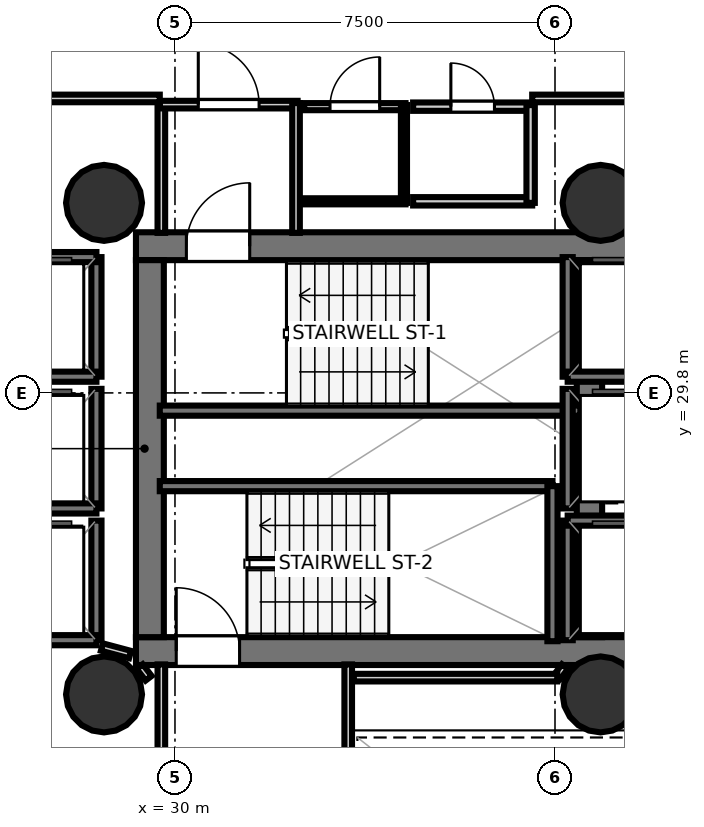
"""IFC4 building model, lengths in metres.
Left out: names, types, materials, properties, quantities, classifications, styles, units other than length and angle.
Written with IfcOpenShell. Run it as: python <this file> out.ifc"""

import sys

from ifc_helpers import new_model, si_unit, direction, frame, frame_2d, origin, origin_2d, place, context, subcontext, project, spatial, rectangle, hollow_circle, extrude, element, fill, save


model = new_model("IFC4")
c1 = context("Model", 3, precision=1e-05, world=origin(), true_north=direction((0.0, 1.0)))
c2 = subcontext(c1, "Body", "Model", "MODEL_VIEW")
j1 = project(units=[si_unit("LENGTHUNIT", "METRE"), si_unit("PLANEANGLEUNIT", "RADIAN")], contexts=[c1])
p1 = place(None, origin())
s1 = spatial("IfcSite", under=j1, at=p1, CompositionType="ELEMENT")
p2 = place(p1, origin())
s2 = spatial("IfcBuilding", under=s1, at=p2, CompositionType="ELEMENT")
p3 = place(p2, frame((0.0, 0.0, 131.1)))
s3 = spatial("IfcBuildingStorey", under=s2, at=p3, CompositionType="ELEMENT", Elevation=131.1)
p4 = place(p3, frame((29.23, 32.695, 0.0), z_axis=(0.0, 0.0, 1.0), x_axis=(1.0, 0.0, 0.0)))
e1 = element("IfcWall", 1, at=p4, inside=s3, PredefinedType="SHEAR", context=c2, shape_type="SweptSolid", body=[
    extrude(rectangle(XDim=10.62, YDim=0.55, at=frame_2d((5.31, 0.0))), origin(), (0.0, 0.0, 1.0), 3.52),
])
p5 = place(p4, frame((0.995, 0.0, 0.0)))
e2 = element("IfcOpeningElement", 2, at=p5, cuts=e1, PredefinedType="OPENING", context=c2, shape_type="SweptSolid", body=[
    extrude(rectangle(XDim=1.25, YDim=2.15, at=frame_2d((0.625, 1.075))), frame((0.0, 0.285, 0.0), z_axis=(0.0, -1.0, 0.0), x_axis=(1.0, 0.0, 0.0)), (0.0, 0.0, 1.0), 0.57),
])
p6 = place(p3, frame((29.23, 24.705, 0.0), z_axis=(0.0, 0.0, 1.0), x_axis=(1.0, 0.0, 0.0)))
e3 = element("IfcWall", 3, at=p6, inside=s3, PredefinedType="SHEAR", context=c2, shape_type="SweptSolid", body=[
    extrude(rectangle(XDim=10.62, YDim=0.55, at=frame_2d((5.31, 0.0))), origin(), (0.0, 0.0, 1.0), 3.52),
])
p7 = place(p6, frame((0.795, 0.0, 0.0)))
e4 = element("IfcOpeningElement", 4, at=p7, cuts=e3, PredefinedType="OPENING", context=c2, shape_type="SweptSolid", body=[
    extrude(rectangle(XDim=1.25, YDim=2.15, at=frame_2d((0.625, 1.075))), frame((0.0, 0.285, 0.0), z_axis=(0.0, -1.0, 0.0), x_axis=(1.0, 0.0, 0.0)), (0.0, 0.0, 1.0), 0.57),
])
p8 = place(p3, frame((29.505, 24.98, 0.0), z_axis=(0.0, 0.0, 1.0), x_axis=(0.0, 1.0, 0.0)))
e5 = element("IfcWall", 5, at=p8, inside=s3, PredefinedType="SHEAR", context=c2, shape_type="SweptSolid", body=[
    extrude(rectangle(XDim=7.44, YDim=0.55, at=frame_2d((3.72, 0.0))), origin(), (0.0, 0.0, 1.0), 3.52),
])
p9 = place(p3, frame((38.18, 24.98, 0.0), z_axis=(0.0, 0.0, 1.0), x_axis=(0.0, 1.0, 0.0)))
e6 = element("IfcWall", 6, at=p9, inside=s3, PredefinedType="SHEAR", context=c2, shape_type="SweptSolid", body=[
    extrude(rectangle(XDim=7.44, YDim=0.5, at=frame_2d((3.72, 0.0))), origin(), (0.0, 0.0, 1.0), 3.52),
])
for number, where, z_axis, x_axis in (
    (7, (28.6, 33.55, 0.0), (0.0, 0.0, 1.0), (1.0, 0.0, 0.0)),
    (8, (28.6, 23.85, 0.0), (0.0, 0.0, 1.0), (1.0, 0.0, 0.0)),
    (9, (38.4, 33.55, 0.0), (0.0, 0.0, 1.0), (1.0, 0.0, 0.0)),
    (10, (38.4, 23.85, 0.0), (0.0, 0.0, 1.0), (1.0, 0.0, 0.0)),
):
    element("IfcColumn", number, at=place(p3, frame(where, z_axis=z_axis, x_axis=x_axis)), inside=s3, PredefinedType="COLUMN", context=c2, shape_type="SweptSolid", body=[
        extrude(hollow_circle(Radius=0.75, WallThickness=0.036, at=origin_2d()), origin(), (0.0, 0.0, 1.0), 3.7),
    ])
p10 = place(p3, frame((29.7, 29.45, 0.0), z_axis=(0.0, 0.0, 1.0), x_axis=(1.0, 0.0, 0.0)))
e11 = element("IfcWall", 11, at=p10, inside=s3, PredefinedType="SOLIDWALL", context=c2, shape_type="SweptSolid", body=[
    extrude(rectangle(XDim=8.3, YDim=0.2, at=frame_2d((4.15, 0.0))), origin(), (0.0, 0.0, 1.0), 3.52),
])
p11 = place(p3, frame((29.7, 27.96, 0.0), z_axis=(0.0, 0.0, 1.0), x_axis=(1.0, 0.0, 0.0)))
e12 = element("IfcWall", 12, at=p11, inside=s3, PredefinedType="SOLIDWALL", context=c2, shape_type="SweptSolid", body=[
    extrude(rectangle(XDim=7.75, YDim=0.2, at=frame_2d((3.875, 0.0))), origin(), (0.0, 0.0, 1.0), 3.52),
])
p12 = place(p3, frame((37.45, 24.9, 0.0), z_axis=(0.0, 0.0, 1.0), x_axis=(0.0, 1.0, 0.0)))
e13 = element("IfcWall", 13, at=p12, inside=s3, PredefinedType="SOLIDWALL", context=c2, shape_type="SweptSolid", body=[
    extrude(rectangle(XDim=3.06, YDim=0.2, at=frame_2d((1.53, 0.0))), origin(), (0.0, 0.0, 1.0), 3.52),
])
p13 = place(p3, frame((37.75, 30.12, 0.0), z_axis=(0.0, 0.0, 1.0), x_axis=(0.0, 1.0, 0.0)))
e14 = element("IfcWall", 14, at=p13, inside=s3, PredefinedType="SOLIDWALL", context=c2, shape_type="SweptSolid", body=[
    extrude(rectangle(XDim=2.36, YDim=0.2, at=frame_2d((1.18, 0.0))), origin(), (0.0, 0.0, 1.0), 3.52),
])
p14 = place(p3, frame((37.75, 30.12, 0.0), z_axis=(0.0, 0.0, 1.0), x_axis=(1.0, 0.0, 0.0)))
e15 = element("IfcWall", 15, at=p14, inside=s3, PredefinedType="SOLIDWALL", context=c2, shape_type="SweptSolid", body=[
    extrude(rectangle(XDim=2.1, YDim=0.2, at=frame_2d((1.05, 0.0))), origin(), (0.0, 0.0, 1.0), 3.52),
])
p15 = place(p3, frame((37.75, 24.92, 0.0), z_axis=(0.0, 0.0, 1.0), x_axis=(0.0, 1.0, 0.0)))
e16 = element("IfcWall", 16, at=p15, inside=s3, PredefinedType="SOLIDWALL", context=c2, shape_type="SweptSolid", body=[
    extrude(rectangle(XDim=2.36, YDim=0.2, at=frame_2d((1.18, 0.0))), origin(), (0.0, 0.0, 1.0), 3.52),
])
p16 = place(p3, frame((37.75, 27.28, 0.0), z_axis=(0.0, 0.0, 1.0), x_axis=(1.0, 0.0, 0.0)))
e17 = element("IfcWall", 17, at=p16, inside=s3, PredefinedType="SOLIDWALL", context=c2, shape_type="SweptSolid", body=[
    extrude(rectangle(XDim=2.1, YDim=0.2, at=frame_2d((1.05, 0.0))), origin(), (0.0, 0.0, 1.0), 3.52),
])
p17 = place(p3, frame((28.45, 30.12, 0.0), z_axis=(0.0, 0.0, 1.0), x_axis=(0.0, 1.0, 0.0)))
e18 = element("IfcWall", 18, at=p17, inside=s3, PredefinedType="SOLIDWALL", context=c2, shape_type="SweptSolid", body=[
    extrude(rectangle(XDim=2.36, YDim=0.2, at=frame_2d((1.18, 0.0))), origin(), (0.0, 0.0, 1.0), 3.52),
])
for number, where, z_axis, x_axis in (
    (19, (26.35, 32.48, 0.0), (0.0, 0.0, 1.0), (1.0, 0.0, 0.0)),
    (20, (26.35, 30.12, 0.0), (0.0, 0.0, 1.0), (1.0, 0.0, 0.0)),
):
    element("IfcWall", number, at=place(p3, frame(where, z_axis=z_axis, x_axis=x_axis)), inside=s3, PredefinedType="SOLIDWALL", context=c2, shape_type="SweptSolid", body=[
        extrude(rectangle(XDim=2.1, YDim=0.2, at=frame_2d((1.05, 0.0))), origin(), (0.0, 0.0, 1.0), 3.52),
    ])
p18 = place(p3, frame((28.45, 27.52, 0.0), z_axis=(0.0, 0.0, 1.0), x_axis=(0.0, 1.0, 0.0)))
e21 = element("IfcWall", 21, at=p18, inside=s3, PredefinedType="SOLIDWALL", context=c2, shape_type="SweptSolid", body=[
    extrude(rectangle(XDim=2.36, YDim=0.2, at=frame_2d((1.18, 0.0))), origin(), (0.0, 0.0, 1.0), 3.52),
])
p19 = place(p3, frame((26.35, 27.52, 0.0), z_axis=(0.0, 0.0, 1.0), x_axis=(1.0, 0.0, 0.0)))
e22 = element("IfcWall", 22, at=p19, inside=s3, PredefinedType="SOLIDWALL", context=c2, shape_type="SweptSolid", body=[
    extrude(rectangle(XDim=2.1, YDim=0.2, at=frame_2d((1.05, 0.0))), origin(), (0.0, 0.0, 1.0), 3.52),
])
p20 = place(p3, frame((28.45, 24.92, 0.0), z_axis=(0.0, 0.0, 1.0), x_axis=(0.0, 1.0, 0.0)))
e23 = element("IfcWall", 23, at=p20, inside=s3, PredefinedType="SOLIDWALL", context=c2, shape_type="SweptSolid", body=[
    extrude(rectangle(XDim=2.36, YDim=0.2, at=frame_2d((1.18, 0.0))), origin(), (0.0, 0.0, 1.0), 3.52),
])
p21 = place(p3, frame((26.35, 24.92, 0.0), z_axis=(0.0, 0.0, 1.0), x_axis=(1.0, 0.0, 0.0)))
e24 = element("IfcWall", 24, at=p21, inside=s3, PredefinedType="SOLIDWALL", context=c2, shape_type="SweptSolid", body=[
    extrude(rectangle(XDim=2.1, YDim=0.2, at=frame_2d((1.05, 0.0))), origin(), (0.0, 0.0, 1.0), 3.52),
])
p22 = place(p3, frame((37.75, 27.52, 0.0), z_axis=(0.0, 0.0, 1.0), x_axis=(0.0, 1.0, 0.0)))
e25 = element("IfcWall", 25, at=p22, inside=s3, PredefinedType="SOLIDWALL", context=c2, shape_type="SweptSolid", body=[
    extrude(rectangle(XDim=2.36, YDim=0.2, at=frame_2d((1.18, 0.0))), origin(), (0.0, 0.0, 1.0), 3.52),
])
p23 = place(p3, frame((29.731, 32.958, 0.0), z_axis=(0.0, 0.0, 1.0), x_axis=(0.0, 1.0, 0.0)))
e26 = element("IfcWall", 26, at=p23, inside=s3, PredefinedType="PARTITIONING", context=c2, shape_type="SweptSolid", body=[
    extrude(rectangle(XDim=2.562, YDim=0.15, at=frame_2d((1.281, 0.0))), origin(), (0.0, 0.0, 1.0), 2.84),
])
p24 = place(p3, frame((29.7, 35.489, 0.0), z_axis=(0.0, 0.0, 1.0), x_axis=(1.0, 0.0, 0.0)))
e27 = element("IfcWall", 27, at=p24, inside=s3, PredefinedType="PARTITIONING", context=c2, shape_type="SweptSolid", body=[
    extrude(rectangle(XDim=2.72, YDim=0.15, at=frame_2d((1.36, 0.0))), origin(), (0.0, 0.0, 1.0), 2.84),
])
p25 = place(p24, frame((0.76, 0.0, 0.0)))
e28 = element("IfcOpeningElement", 28, at=p25, cuts=e27, PredefinedType="OPENING", context=c2, shape_type="SweptSolid", body=[
    extrude(rectangle(XDim=1.2, YDim=2.15, at=frame_2d((0.6, 1.075))), frame((0.0, 0.085, 0.0), z_axis=(0.0, -1.0, 0.0), x_axis=(1.0, 0.0, 0.0)), (0.0, 0.0, 1.0), 0.17),
])
p26 = place(p3, frame((32.389, 35.52, 0.0), z_axis=(0.0, 0.0, 1.0), x_axis=(0.0, -1.0, 0.0)))
e29 = element("IfcWall", 29, at=p26, inside=s3, PredefinedType="PARTITIONING", context=c2, shape_type="SweptSolid", body=[
    extrude(rectangle(XDim=2.562, YDim=0.15, at=frame_2d((1.281, 0.0))), origin(), (0.0, 0.0, 1.0), 2.84),
])
for number, where, z_axis, x_axis in (
    (30, (29.731, 21.85, 0.0), (0.0, 0.0, 1.0), (0.0, 1.0, 0.0)),
    (31, (33.419, 24.442, 0.0), (0.0, 0.0, 1.0), (0.0, -1.0, 0.0)),
):
    element("IfcWall", number, at=place(p3, frame(where, z_axis=z_axis, x_axis=x_axis)), inside=s3, PredefinedType="PARTITIONING", context=c2, shape_type="SweptSolid", body=[
        extrude(rectangle(XDim=2.592, YDim=0.15, at=frame_2d((1.296, 0.0))), origin(), (0.0, 0.0, 1.0), 2.84),
    ])
p27 = place(p3, frame((34.55, 33.581, 0.0), z_axis=(0.0, 0.0, 1.0), x_axis=(-1.0, 0.0, 0.0)))
e32 = element("IfcWall", 32, at=p27, inside=s3, PredefinedType="PARTITIONING", context=c2, shape_type="SweptSolid", body=[
    extrude(rectangle(XDim=2.0, YDim=0.12, at=frame_2d((1.0, 0.0))), origin(), (0.0, 0.0, 1.0), 2.84),
])
p28 = place(p3, frame((32.55, 35.449, 0.0), z_axis=(0.0, 0.0, 1.0), x_axis=(1.0, 0.0, 0.0)))
e33 = element("IfcWall", 33, at=p28, inside=s3, PredefinedType="PARTITIONING", context=c2, shape_type="SweptSolid", body=[
    extrude(rectangle(XDim=2.0, YDim=0.14, at=frame_2d((1.0, 0.0))), origin(), (0.0, 0.0, 1.0), 2.84),
])
p29 = place(p28, frame((0.51, 0.0, 0.0)))
e34 = element("IfcOpeningElement", 34, at=p29, cuts=e33, PredefinedType="OPENING", context=c2, shape_type="SweptSolid", body=[
    extrude(rectangle(XDim=0.98, YDim=2.1, at=frame_2d((0.49, 1.05))), frame((0.0, 0.08, 0.0), z_axis=(0.0, -1.0, 0.0), x_axis=(1.0, 0.0, 0.0)), (0.0, 0.0, 1.0), 0.16),
])
p30 = place(p3, frame((34.519, 35.48, 0.0), z_axis=(0.0, 0.0, 1.0), x_axis=(0.0, -1.0, 0.0)))
e35 = element("IfcWall", 35, at=p30, inside=s3, PredefinedType="PARTITIONING", context=c2, shape_type="SweptSolid", body=[
    extrude(rectangle(XDim=1.93, YDim=0.12, at=frame_2d((0.965, 0.0))), origin(), (0.0, 0.0, 1.0), 2.84),
])
p31 = place(p3, frame((37.05, 33.581, 0.0), z_axis=(0.0, 0.0, 1.0), x_axis=(-1.0, 0.0, 0.0)))
e36 = element("IfcWall", 36, at=p31, inside=s3, PredefinedType="PLUMBINGWALL", context=c2, shape_type="SweptSolid", body=[
    extrude(rectangle(XDim=2.35, YDim=0.165, at=frame_2d((1.175, 0.0))), origin(), (0.0, 0.0, 1.0), 2.84),
])
p32 = place(p3, frame((34.7, 35.449, 0.0), z_axis=(0.0, 0.0, 1.0), x_axis=(1.0, 0.0, 0.0)))
e37 = element("IfcWall", 37, at=p32, inside=s3, PredefinedType="PLUMBINGWALL", context=c2, shape_type="SweptSolid", body=[
    extrude(rectangle(XDim=2.35, YDim=0.165, at=frame_2d((1.175, 0.0))), origin(), (0.0, 0.0, 1.0), 2.84),
])
p33 = place(p32, frame((0.745, 0.0, 0.0)))
e38 = element("IfcOpeningElement", 38, at=p33, cuts=e37, PredefinedType="OPENING", context=c2, shape_type="SweptSolid", body=[
    extrude(rectangle(XDim=0.86, YDim=2.05, at=frame_2d((0.43, 1.025))), frame((0.0, 0.093, 0.0), z_axis=(0.0, -1.0, 0.0), x_axis=(1.0, 0.0, 0.0)), (0.0, 0.0, 1.0), 0.185),
])
p34 = place(p3, frame((37.019, 35.48, 0.0), z_axis=(0.0, 0.0, 1.0), x_axis=(0.0, -1.0, 0.0)))
e39 = element("IfcWall", 39, at=p34, inside=s3, PredefinedType="PLUMBINGWALL", context=c2, shape_type="SweptSolid", body=[
    extrude(rectangle(XDim=1.93, YDim=0.165, at=frame_2d((0.965, 0.0))), origin(), (0.0, 0.0, 1.0), 2.84),
])
p35 = place(p3, frame((29.48, 24.169, 0.0), z_axis=(0.0, 0.0, 1.0), x_axis=(-0.608043045279, 0.79390405912, 0.0)))
e40 = element("IfcWall", 40, at=p35, inside=s3, PredefinedType="PARTITIONING", context=c2, shape_type="SweptSolid", body=[
    extrude(rectangle(XDim=0.29, YDim=0.15, at=frame_2d((0.145, 0.0))), origin(), (0.0, 0.0, 1.0), 2.84),
])
p36 = place(p3, frame((29.114, 24.637, 0.0), z_axis=(0.0, 0.0, 1.0), x_axis=(-0.966199685486, 0.257794817183, 0.0)))
e41 = element("IfcWall", 41, at=p36, inside=s3, PredefinedType="PARTITIONING", context=c2, shape_type="SweptSolid", body=[
    extrude(rectangle(XDim=0.575, YDim=0.15, at=frame_2d((0.288, 0.0))), origin(), (0.0, 0.0, 1.0), 2.84),
])
p37 = place(p3, frame((37.697, 24.399, 0.0), z_axis=(0.0, 0.0, 1.0), x_axis=(-0.60763139403, -0.794219169367, 0.0)))
e42 = element("IfcWall", 42, at=p37, inside=s3, PredefinedType="PARTITIONING", context=c2, shape_type="SweptSolid", body=[
    extrude(rectangle(XDim=0.25, YDim=0.15, at=frame_2d((0.125, 0.0))), origin(), (0.0, 0.0, 1.0), 2.84),
])
p38 = place(p3, frame((37.545, 24.181, 0.0), z_axis=(0.0, 0.0, 1.0), x_axis=(-1.0, 0.0, 0.0)))
e43 = element("IfcWall", 43, at=p38, inside=s3, PredefinedType="PARTITIONING", context=c2, shape_type="SweptSolid", body=[
    extrude(rectangle(XDim=4.015, YDim=0.15, at=frame_2d((2.007, 0.0))), origin(), (0.0, 0.0, 1.0), 2.84),
])
p39 = place(p3, frame((39.818, 35.611, 0.0), z_axis=(0.0, 0.0, 1.0), x_axis=(-1.0, 0.0, 0.0)))
e44 = element("IfcWall", 44, at=p39, inside=s3, PredefinedType="PARTITIONING", context=c2, shape_type="SweptSolid", body=[
    extrude(rectangle(XDim=2.768, YDim=0.15, at=frame_2d((1.384, 0.0))), origin(), (0.0, 0.0, 1.0), 2.84),
])
p40 = place(p3, frame((29.7, 35.611, 0.0), z_axis=(0.0, 0.0, 1.0), x_axis=(-1.0, 0.0, 0.0)))
e45 = element("IfcWall", 45, at=p40, inside=s3, PredefinedType="PARTITIONING", context=c2, shape_type="SweptSolid", body=[
    extrude(rectangle(XDim=3.28, YDim=0.15, at=frame_2d((1.64, 0.0))), origin(), (0.0, 0.0, 1.0), 2.84),
])
p41 = place(p5, origin())
e46 = element("IfcDoor", 46, at=p41, inside=s3, OperationType="SINGLE_SWING_RIGHT", PredefinedType="DOOR", context=c2, shape_type="SweptSolid", body=[
    extrude(rectangle(XDim=1.25, YDim=2.15, at=frame_2d((0.625, 1.075))), frame((0.0, 0.025, 0.0), z_axis=(0.0, -1.0, 0.0), x_axis=(1.0, 0.0, 0.0)), (0.0, 0.0, 1.0), 0.05),
])
fill(e2, e46)
p42 = place(p7, origin())
e47 = element("IfcDoor", 47, at=p42, inside=s3, OperationType="SINGLE_SWING_LEFT", PredefinedType="DOOR", context=c2, shape_type="SweptSolid", body=[
    extrude(rectangle(XDim=1.25, YDim=2.15, at=frame_2d((0.625, 1.075))), frame((0.0, 0.025, 0.0), z_axis=(0.0, -1.0, 0.0), x_axis=(1.0, 0.0, 0.0)), (0.0, 0.0, 1.0), 0.05),
])
fill(e4, e47)
p43 = place(p25, origin())
e48 = element("IfcDoor", 48, at=p43, inside=s3, OperationType="SINGLE_SWING_LEFT", PredefinedType="DOOR", context=c2, shape_type="SweptSolid", body=[
    extrude(rectangle(XDim=1.2, YDim=2.15, at=frame_2d((0.6, 1.075))), frame((0.0, 0.025, 0.0), z_axis=(0.0, -1.0, 0.0), x_axis=(1.0, 0.0, 0.0)), (0.0, 0.0, 1.0), 0.05),
])
fill(e28, e48)
p44 = place(p29, origin())
e49 = element("IfcDoor", 49, at=p44, inside=s3, OperationType="SINGLE_SWING_RIGHT", PredefinedType="DOOR", context=c2, shape_type="SweptSolid", body=[
    extrude(rectangle(XDim=0.98, YDim=2.1, at=frame_2d((0.49, 1.05))), frame((0.0, 0.025, 0.0), z_axis=(0.0, -1.0, 0.0), x_axis=(1.0, 0.0, 0.0)), (0.0, 0.0, 1.0), 0.05),
])
fill(e34, e49)
p45 = place(p33, origin())
e50 = element("IfcDoor", 50, at=p45, inside=s3, OperationType="SINGLE_SWING_LEFT", PredefinedType="DOOR", context=c2, shape_type="SweptSolid", body=[
    extrude(rectangle(XDim=0.86, YDim=2.05, at=frame_2d((0.43, 1.025))), frame((0.0, 0.025, 0.0), z_axis=(0.0, -1.0, 0.0), x_axis=(1.0, 0.0, 0.0)), (0.0, 0.0, 1.0), 0.05),
])
fill(e38, e50)
save(model, sys.argv[1])
